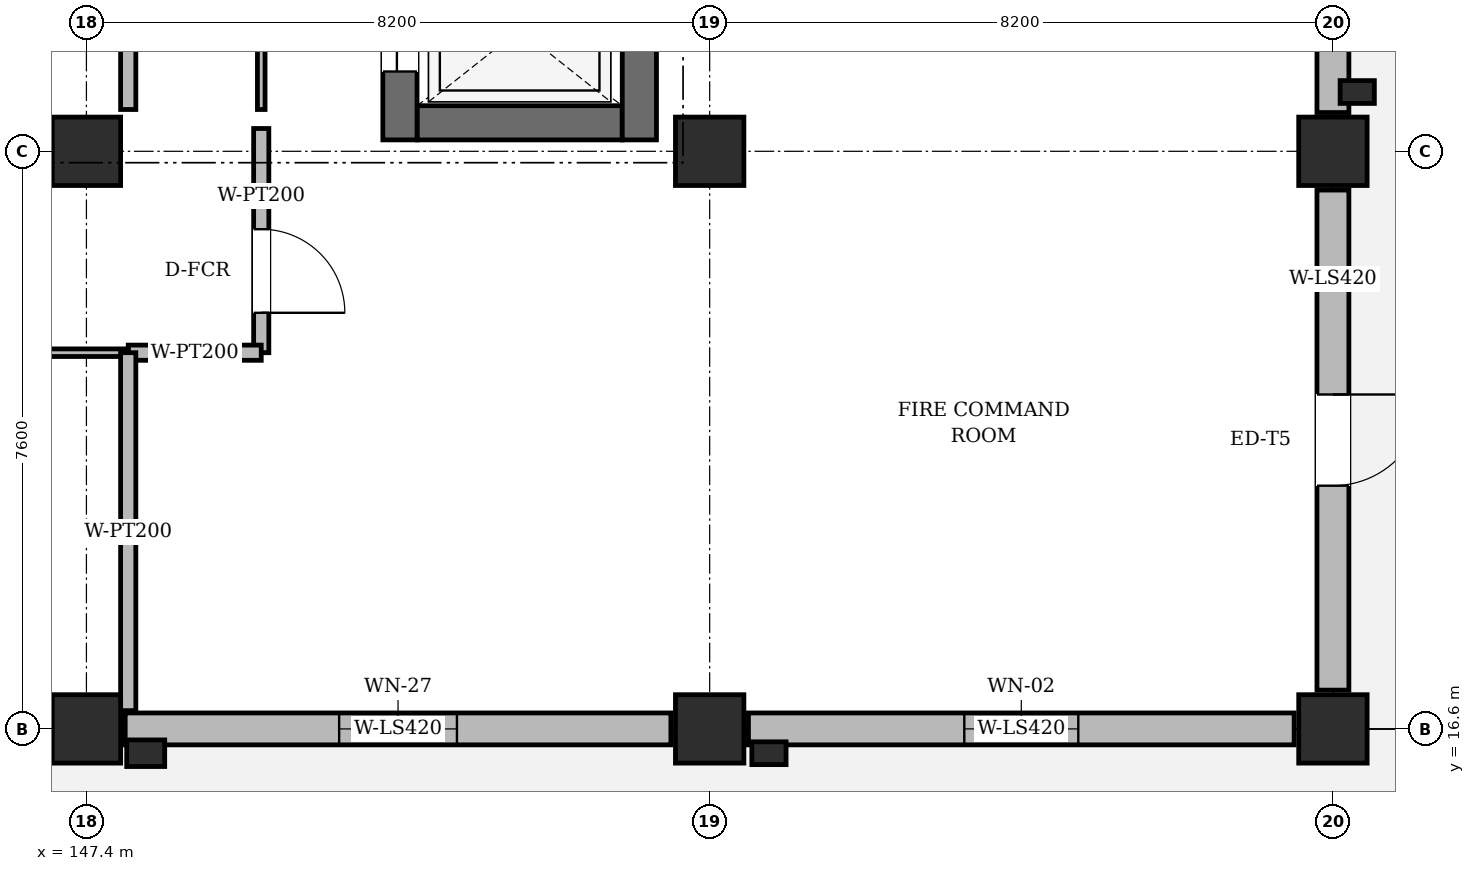
"""IFC4 building model, lengths in metres.
Left out: names, types, materials, properties, quantities, classifications, styles, units other than length and angle.
Written with IfcOpenShell. Run it as: python <this file> out.ifc"""

import sys

from ifc_helpers import new_model, si_unit, direction, frame, frame_2d, origin, origin_2d, place, context, subcontext, project, spatial, rectangle, extrude, element, fill, save


model = new_model("IFC4")
c1 = context("Model", 3, precision=1e-05, world=origin(), true_north=direction((0.0, 1.0)))
c2 = subcontext(c1, "Body", "Model", "MODEL_VIEW")
j1 = project(units=[si_unit("LENGTHUNIT", "METRE"), si_unit("PLANEANGLEUNIT", "RADIAN")], contexts=[c1])
p1 = place(None, origin())
s1 = spatial("IfcSite", under=j1, at=p1, CompositionType="ELEMENT")
p2 = place(p1, origin())
s2 = spatial("IfcBuilding", under=s1, at=p2, CompositionType="ELEMENT")
p3 = place(p2, origin())
s3 = spatial("IfcBuildingStorey", under=s2, at=p3, CompositionType="ELEMENT", Elevation=0.0)
for number, where, z_axis, x_axis in (
    (1, (147.4, 16.6, 0.0), (0.0, 0.0, 1.0), (1.0, 0.0, 0.0)),
    (2, (147.4, 24.2, 0.0), (0.0, 0.0, 1.0), (1.0, 0.0, 0.0)),
    (3, (155.6, 16.6, 0.0), (0.0, 0.0, 1.0), (1.0, 0.0, 0.0)),
    (4, (155.6, 24.2, 0.0), (0.0, 0.0, 1.0), (1.0, 0.0, 0.0)),
    (5, (163.8, 16.6, 0.0), (0.0, 0.0, 1.0), (1.0, 0.0, 0.0)),
    (6, (163.8, 24.2, 0.0), (0.0, 0.0, 1.0), (1.0, 0.0, 0.0)),
):
    element("IfcColumn", number, at=place(p3, frame(where, z_axis=z_axis, x_axis=x_axis)), inside=s3, PredefinedType="COLUMN", context=c2, shape_type="SweptSolid", body=[
        extrude(rectangle(XDim=0.9, YDim=0.9, at=origin_2d()), origin(), (0.0, 0.0, 1.0), 5.1),
    ])
p4 = place(p3, frame((148.18, 16.28, 0.0), z_axis=(0.0, 0.0, 1.0), x_axis=(1.0, 0.0, 0.0)))
e7 = element("IfcColumn", 7, at=p4, inside=s3, PredefinedType="PILASTER", context=c2, shape_type="SweptSolid", body=[
    extrude(rectangle(XDim=0.5, YDim=0.35, at=origin_2d()), origin(), (0.0, 0.0, 1.0), 5.175),
])
for number, where, z_axis, x_axis in (
    (8, (156.38, 16.28, 0.0), (0.0, 0.0, 1.0), (1.0, 0.0, 0.0)),
    (9, (164.12, 24.98, 0.0), (0.0, 0.0, 1.0), (1.0, 0.0, 0.0)),
):
    element("IfcColumn", number, at=place(p3, frame(where, z_axis=z_axis, x_axis=x_axis)), inside=s3, PredefinedType="PILASTER", context=c2, shape_type="SweptSolid", body=[
        extrude(rectangle(XDim=0.45, YDim=0.3, at=origin_2d()), origin(), (0.0, 0.0, 1.0), 5.175),
    ])
p5 = place(p3, frame((147.91, 16.6, 0.0), z_axis=(0.0, 0.0, 1.0), x_axis=(1.0, 0.0, 0.0)))
e10 = element("IfcWall", 10, at=p5, inside=s3, PredefinedType="SOLIDWALL", context=c2, shape_type="SweptSolid", body=[
    extrude(rectangle(XDim=7.18, YDim=0.42, at=frame_2d((3.59, 0.0))), origin(), (0.0, 0.0, 1.0), 4.335),
])
p6 = place(p5, frame((2.815, 0.0, 0.95)))
e11 = element("IfcOpeningElement", 11, at=p6, cuts=e10, PredefinedType="OPENING", context=c2, shape_type="SweptSolid", body=[
    extrude(rectangle(XDim=1.55, YDim=1.75, at=frame_2d((0.775, 0.875))), frame((0.0, 0.222, 0.0), z_axis=(0.0, -1.0, 0.0), x_axis=(1.0, 0.0, 0.0)), (0.0, 0.0, 1.0), 0.444),
])
p7 = place(p3, frame((156.11, 16.6, 0.0), z_axis=(0.0, 0.0, 1.0), x_axis=(1.0, 0.0, 0.0)))
e12 = element("IfcWall", 12, at=p7, inside=s3, PredefinedType="SOLIDWALL", context=c2, shape_type="SweptSolid", body=[
    extrude(rectangle(XDim=7.18, YDim=0.42, at=frame_2d((3.59, 0.0))), origin(), (0.0, 0.0, 1.0), 4.335),
])
p8 = place(p7, frame((2.84, 0.0, 0.95)))
e13 = element("IfcOpeningElement", 13, at=p8, cuts=e12, PredefinedType="OPENING", context=c2, shape_type="SweptSolid", body=[
    extrude(rectangle(XDim=1.5, YDim=2.1, at=frame_2d((0.75, 1.05))), frame((0.0, 0.222, 0.0), z_axis=(0.0, -1.0, 0.0), x_axis=(1.0, 0.0, 0.0)), (0.0, 0.0, 1.0), 0.444),
])
p9 = place(p3, frame((163.8, 17.11, 0.0), z_axis=(0.0, 0.0, 1.0), x_axis=(0.0, 1.0, 0.0)))
e14 = element("IfcWall", 14, at=p9, inside=s3, PredefinedType="SOLIDWALL", context=c2, shape_type="SweptSolid", body=[
    extrude(rectangle(XDim=6.58, YDim=0.42, at=frame_2d((3.29, 0.0))), origin(), (0.0, 0.0, 1.0), 4.335),
])
p10 = place(p9, frame((2.69, 0.0, 0.0)))
e15 = element("IfcOpeningElement", 15, at=p10, cuts=e14, PredefinedType="OPENING", context=c2, shape_type="SweptSolid", body=[
    extrude(rectangle(XDim=1.2, YDim=2.2, at=frame_2d((0.6, 1.1))), frame((0.0, 0.222, 0.0), z_axis=(0.0, -1.0, 0.0), x_axis=(1.0, 0.0, 0.0)), (0.0, 0.0, 1.0), 0.444),
])
p11 = place(p3, frame((163.8, 24.71, 0.0), z_axis=(0.0, 0.0, 1.0), x_axis=(0.0, 1.0, 0.0)))
e16 = element("IfcWall", 16, at=p11, inside=s3, PredefinedType="SOLIDWALL", context=c2, shape_type="SweptSolid", body=[
    extrude(rectangle(XDim=6.58, YDim=0.42, at=frame_2d((3.29, 0.0))), origin(), (0.0, 0.0, 1.0), 4.335),
])
p12 = place(p11, frame((2.815, 0.0, 0.95)))
e17 = element("IfcOpeningElement", 17, at=p12, cuts=e16, PredefinedType="OPENING", context=c2, shape_type="SweptSolid", body=[
    extrude(rectangle(XDim=0.95, YDim=1.25, at=frame_2d((0.475, 0.625))), frame((0.0, 0.222, 0.0), z_axis=(0.0, -1.0, 0.0), x_axis=(1.0, 0.0, 0.0)), (0.0, 0.0, 1.0), 0.444),
])
p13 = place(p3, frame((151.75, 24.575, 0.0), z_axis=(0.0, 0.0, 1.0), x_axis=(1.0, 0.0, 0.0)))
e18 = element("IfcWall", 18, at=p13, inside=s3, PredefinedType="SHEAR", context=c2, shape_type="SweptSolid", body=[
    extrude(rectangle(XDim=2.7, YDim=0.45, at=frame_2d((1.35, 0.0))), origin(), (0.0, 0.0, 1.0), 5.1),
])
p14 = place(p3, frame((151.525, 24.35, 0.0), z_axis=(0.0, 0.0, 1.0), x_axis=(0.0, 1.0, 0.0)))
e19 = element("IfcWall", 19, at=p14, inside=s3, PredefinedType="SHEAR", context=c2, shape_type="SweptSolid", body=[
    extrude(rectangle(XDim=2.9, YDim=0.45, at=frame_2d((1.45, 0.0))), origin(), (0.0, 0.0, 1.0), 5.1),
])
p15 = place(p14, frame((0.9, 0.0, 0.0)))
e20 = element("IfcOpeningElement", 20, at=p15, cuts=e19, PredefinedType="OPENING", context=c2, shape_type="SweptSolid", body=[
    extrude(rectangle(XDim=1.1, YDim=2.2, at=frame_2d((0.55, 1.1))), frame((0.0, 0.237, 0.0), z_axis=(0.0, -1.0, 0.0), x_axis=(1.0, 0.0, 0.0)), (0.0, 0.0, 1.0), 0.474),
])
p16 = place(p3, frame((154.675, 24.35, 0.0), z_axis=(0.0, 0.0, 1.0), x_axis=(0.0, 1.0, 0.0)))
e21 = element("IfcWall", 21, at=p16, inside=s3, PredefinedType="SHEAR", context=c2, shape_type="SweptSolid", body=[
    extrude(rectangle(XDim=2.9, YDim=0.45, at=frame_2d((1.45, 0.0))), origin(), (0.0, 0.0, 1.0), 5.1),
])
p17 = place(p3, frame((147.95, 31.75, 0.0), z_axis=(0.0, 0.0, 1.0), x_axis=(0.0, -1.0, 0.0)))
e22 = element("IfcWall", 22, at=p17, inside=s3, PredefinedType="PARTITIONING", context=c2, shape_type="SweptSolid", body=[
    extrude(rectangle(XDim=7.0, YDim=0.2, at=frame_2d((3.5, 0.0))), origin(), (0.0, 0.0, 1.0), 5.005),
])
p18 = place(p17, frame((2.75, 0.0, 0.0)))
e23 = element("IfcOpeningElement", 23, at=p18, cuts=e22, PredefinedType="OPENING", context=c2, shape_type="SweptSolid", body=[
    extrude(rectangle(XDim=1.5, YDim=2.2, at=frame_2d((0.75, 1.1))), frame((0.0, 0.112, 0.0), z_axis=(0.0, -1.0, 0.0), x_axis=(1.0, 0.0, 0.0)), (0.0, 0.0, 1.0), 0.224),
])
p19 = place(p3, frame((149.7, 24.75, 0.0), z_axis=(0.0, 0.0, 1.0), x_axis=(0.0, 1.0, 0.0)))
e24 = element("IfcWall", 24, at=p19, inside=s3, PredefinedType="PARTITIONING", context=c2, shape_type="SweptSolid", body=[
    extrude(rectangle(XDim=11.3, YDim=0.1, at=frame_2d((5.65, 0.0))), origin(), (0.0, 0.0, 1.0), 5.005),
])
p20 = place(p19, frame((4.75, 0.0, 0.0)))
e25 = element("IfcOpeningElement", 25, at=p20, cuts=e24, PredefinedType="OPENING", context=c2, shape_type="SweptSolid", body=[
    extrude(rectangle(XDim=1.8, YDim=2.4, at=frame_2d((0.9, 1.2))), frame((0.0, 0.062, 0.0), z_axis=(0.0, -1.0, 0.0), x_axis=(1.0, 0.0, 0.0)), (0.0, 0.0, 1.0), 0.124),
])
p21 = place(p3, frame((149.7, 24.5, 0.0), z_axis=(0.0, 0.0, 1.0), x_axis=(0.0, -1.0, 0.0)))
e26 = element("IfcWall", 26, at=p21, inside=s3, PredefinedType="PARTITIONING", context=c2, shape_type="SweptSolid", body=[
    extrude(rectangle(XDim=0.8, YDim=0.2, at=frame_2d((0.4, 0.0))), origin(), (0.0, 0.0, 1.0), 5.005),
])
p22 = place(p3, frame((149.7, 23.7, 0.0), z_axis=(0.0, 0.0, 1.0), x_axis=(0.0, -1.0, 0.0)))
e27 = element("IfcWall", 27, at=p22, inside=s3, PredefinedType="PARTITIONING", context=c2, shape_type="SweptSolid", body=[
    extrude(rectangle(XDim=2.15, YDim=0.2, at=frame_2d((1.075, 0.0))), origin(), (0.0, 0.0, 1.0), 5.005),
])
p23 = place(p22, frame((0.525, 0.0, 0.0)))
e28 = element("IfcOpeningElement", 28, at=p23, cuts=e27, PredefinedType="OPENING", context=c2, shape_type="SweptSolid", body=[
    extrude(rectangle(XDim=1.1, YDim=2.2, at=frame_2d((0.55, 1.1))), frame((0.0, 0.112, 0.0), z_axis=(0.0, -1.0, 0.0), x_axis=(1.0, 0.0, 0.0)), (0.0, 0.0, 1.0), 0.224),
])
p24 = place(p3, frame((149.7, 21.55, 0.0), z_axis=(0.0, 0.0, 1.0), x_axis=(-1.0, 0.0, 0.0)))
e29 = element("IfcWall", 29, at=p24, inside=s3, PredefinedType="PARTITIONING", context=c2, shape_type="SweptSolid", body=[
    extrude(rectangle(XDim=1.75, YDim=0.2, at=frame_2d((0.875, 0.0))), origin(), (0.0, 0.0, 1.0), 4.675),
])
p25 = place(p3, frame((147.95, 21.55, 0.0), z_axis=(0.0, 0.0, 1.0), x_axis=(-1.0, 0.0, 0.0)))
e30 = element("IfcWall", 30, at=p25, inside=s3, PredefinedType="PARTITIONING", context=c2, shape_type="SweptSolid", body=[
    extrude(rectangle(XDim=49.35, YDim=0.1, at=frame_2d((24.675, 0.0))), origin(), (0.0, 0.0, 1.0), 4.525),
])
p26 = place(p25, frame((23.775, 0.0, 0.0)))
e31 = element("IfcOpeningElement", 31, at=p26, cuts=e30, PredefinedType="OPENING", context=c2, shape_type="SweptSolid", body=[
    extrude(rectangle(XDim=1.8, YDim=2.4, at=frame_2d((0.9, 1.2))), frame((0.0, 0.062, 0.0), z_axis=(0.0, -1.0, 0.0), x_axis=(1.0, 0.0, 0.0)), (0.0, 0.0, 1.0), 0.124),
])
p27 = place(p3, frame((147.95, 16.84, 0.0), z_axis=(0.0, 0.0, 1.0), x_axis=(0.0, 1.0, 0.0)))
e32 = element("IfcWall", 32, at=p27, inside=s3, PredefinedType="PARTITIONING", context=c2, shape_type="SweptSolid", body=[
    extrude(rectangle(XDim=4.71, YDim=0.2, at=frame_2d((2.355, 0.0))), origin(), (0.0, 0.0, 1.0), 5.005),
])
p28 = place(p6, origin())
e33 = element("IfcWindow", 33, at=p28, inside=s3, PartitioningType="DOUBLE_PANEL_VERTICAL", PredefinedType="WINDOW", context=c2, shape_type="SweptSolid", body=[
    extrude(rectangle(XDim=1.55, YDim=1.75, at=frame_2d((0.775, 0.875))), frame((0.0, 0.03, 0.0), z_axis=(0.0, -1.0, 0.0), x_axis=(1.0, 0.0, 0.0)), (0.0, 0.0, 1.0), 0.06),
])
fill(e11, e33)
p29 = place(p8, origin())
e34 = element("IfcWindow", 34, at=p29, inside=s3, PartitioningType="DOUBLE_PANEL_VERTICAL", PredefinedType="WINDOW", context=c2, shape_type="SweptSolid", body=[
    extrude(rectangle(XDim=1.5, YDim=2.1, at=frame_2d((0.75, 1.05))), frame((0.0, 0.03, 0.0), z_axis=(0.0, -1.0, 0.0), x_axis=(1.0, 0.0, 0.0)), (0.0, 0.0, 1.0), 0.06),
])
fill(e13, e34)
p30 = place(p10, frame((1.2, 0.0, 0.0), z_axis=(0.0, 0.0, 1.0), x_axis=(-1.0, 0.0, 0.0)))
e35 = element("IfcDoor", 35, at=p30, inside=s3, OperationType="SINGLE_SWING_LEFT", PredefinedType="DOOR", context=c2, shape_type="SweptSolid", body=[
    extrude(rectangle(XDim=1.2, YDim=2.2, at=frame_2d((0.6, 1.1))), frame((0.0, 0.025, 0.0), z_axis=(0.0, -1.0, 0.0), x_axis=(1.0, 0.0, 0.0)), (0.0, 0.0, 1.0), 0.05),
])
fill(e15, e35)
p31 = place(p15, origin())
e36 = element("IfcDoor", 36, at=p31, inside=s3, OperationType="DOUBLE_DOOR_SLIDING", PredefinedType="DOOR", context=c2, shape_type="SweptSolid", body=[
    extrude(rectangle(XDim=1.1, YDim=2.2, at=frame_2d((0.55, 1.1))), frame((0.0, 0.025, 0.0), z_axis=(0.0, -1.0, 0.0), x_axis=(1.0, 0.0, 0.0)), (0.0, 0.0, 1.0), 0.05),
])
fill(e20, e36)
p32 = place(p23, origin())
e37 = element("IfcDoor", 37, at=p32, inside=s3, OperationType="SINGLE_SWING_RIGHT", PredefinedType="DOOR", context=c2, shape_type="SweptSolid", body=[
    extrude(rectangle(XDim=1.1, YDim=2.2, at=frame_2d((0.55, 1.1))), frame((0.0, 0.025, 0.0), z_axis=(0.0, -1.0, 0.0), x_axis=(1.0, 0.0, 0.0)), (0.0, 0.0, 1.0), 0.05),
])
fill(e28, e37)
save(model, sys.argv[1])
